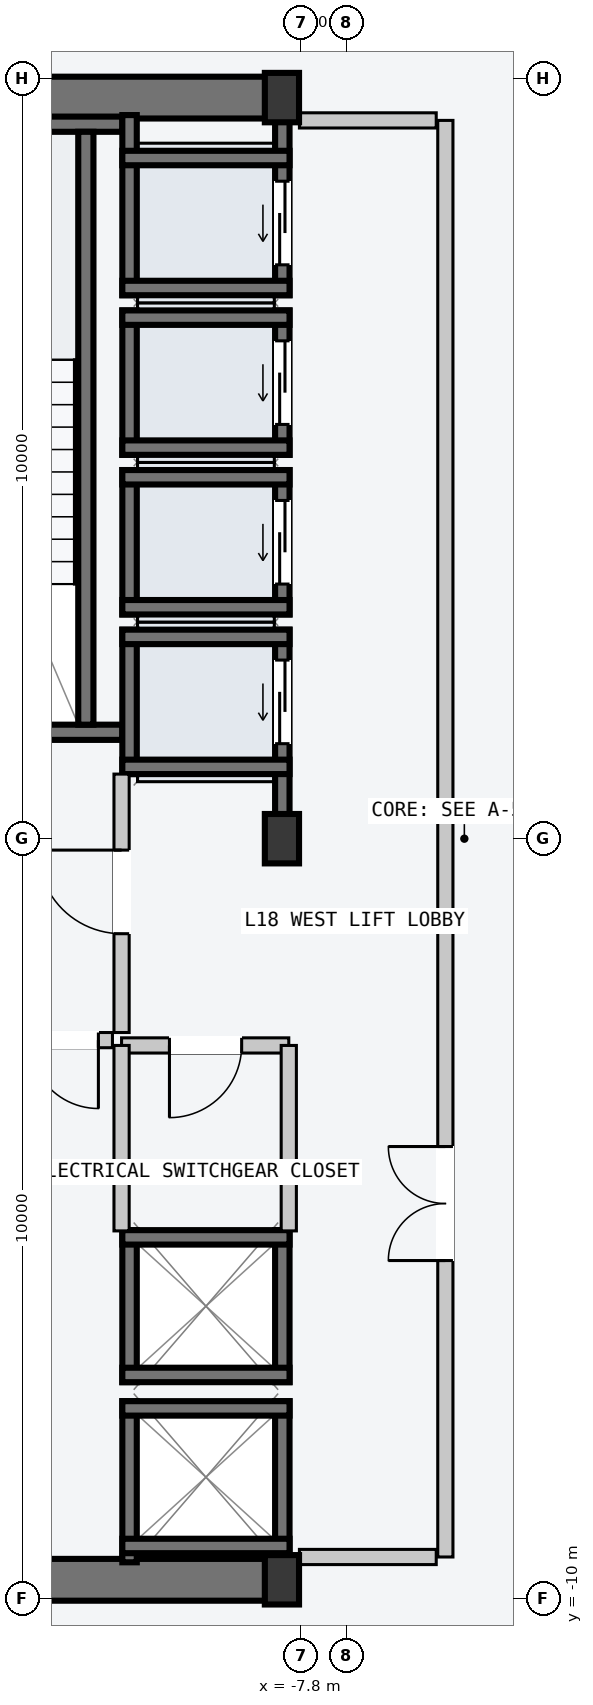
"""IFC4 building model, lengths in metres.
Left out: names, types, materials, properties, quantities, classifications, styles, units other than length and angle.
Written with IfcOpenShell. Run it as: python <this file> out.ifc"""

import sys

from ifc_helpers import new_model, si_unit, direction, frame, frame_2d, origin, origin_2d, place, context, subcontext, project, spatial, rectangle, i_section, extrude, element, fill, save


model = new_model("IFC4")
c1 = context("Model", 3, precision=1e-05, world=origin(), true_north=direction((0.0, 1.0)))
c2 = subcontext(c1, "Body", "Model", "MODEL_VIEW")
j1 = project(units=[si_unit("LENGTHUNIT", "METRE"), si_unit("PLANEANGLEUNIT", "RADIAN")], contexts=[c1])
p1 = place(None, origin())
s1 = spatial("IfcSite", under=j1, at=p1, CompositionType="ELEMENT")
p2 = place(p1, origin())
s2 = spatial("IfcBuilding", under=s1, at=p2, CompositionType="ELEMENT")
p3 = place(p2, frame((0.0, 0.0, 70.8)))
s3 = spatial("IfcBuildingStorey", under=s2, at=p3, CompositionType="ELEMENT", Elevation=70.8)
for number, where, z_axis, x_axis in (
    (1, (-14.53, -9.75, -0.2), (0.0, 0.0, 1.0), (1.0, 0.0, 0.0)),
    (2, (-14.53, 9.75, -0.2), (0.0, 0.0, 1.0), (1.0, 0.0, 0.0)),
):
    element("IfcWall", number, at=place(p3, frame(where, z_axis=z_axis, x_axis=x_axis)), inside=s3, PredefinedType="SHEAR", context=c2, shape_type="SweptSolid", body=[
        extrude(rectangle(XDim=6.46, YDim=0.55, at=frame_2d((3.23, 0.0))), origin(), (0.0, 0.0, 1.0), 3.6),
    ])
p4 = place(p3, frame((-14.25, 1.4, -0.2), z_axis=(0.0, 0.0, 1.0), x_axis=(1.0, 0.0, 0.0)))
e3 = element("IfcWall", 3, at=p4, inside=s3, PredefinedType="SOLIDWALL", context=c2, shape_type="SweptSolid", body=[
    extrude(rectangle(XDim=4.1, YDim=0.2, at=frame_2d((2.05, 0.0))), origin(), (0.0, 0.0, 1.0), 3.6),
])
p5 = place(p4, frame((1.5, 0.0, 0.2)))
e4 = element("IfcOpeningElement", 4, at=p5, cuts=e3, PredefinedType="OPENING", context=c2, shape_type="SweptSolid", body=[
    extrude(rectangle(XDim=1.12, YDim=2.18, at=frame_2d((0.56, 1.09))), frame((0.0, 0.11, 0.0), z_axis=(0.0, -1.0, 0.0), x_axis=(1.0, 0.0, 0.0)), (0.0, 0.0, 1.0), 0.22),
])
p6 = place(p3, frame((-14.25, 9.4, -0.2), z_axis=(0.0, 0.0, 1.0), x_axis=(1.0, 0.0, 0.0)))
e5 = element("IfcWall", 5, at=p6, inside=s3, PredefinedType="SOLIDWALL", context=c2, shape_type="SweptSolid", body=[
    extrude(rectangle(XDim=4.1, YDim=0.2, at=frame_2d((2.05, 0.0))), origin(), (0.0, 0.0, 1.0), 3.6),
])
p7 = place(p3, frame((-10.63, 1.5, -0.2), z_axis=(0.0, 0.0, 1.0), x_axis=(0.0, 1.0, 0.0)))
e6 = element("IfcWall", 6, at=p7, inside=s3, PredefinedType="SOLIDWALL", context=c2, shape_type="SweptSolid", body=[
    extrude(rectangle(XDim=7.8, YDim=0.2, at=frame_2d((3.9, 0.0))), origin(), (0.0, 0.0, 1.0), 3.6),
])
for number, where, z_axis, x_axis in (
    (7, (-8.05, -9.75, 0.0), (0.0, 0.0, 1.0), (1.0, 0.0, 0.0)),
    (8, (-8.05, 0.0, 0.0), (0.0, 0.0, 1.0), (1.0, 0.0, 0.0)),
    (9, (-8.05, 9.75, 0.0), (0.0, 0.0, 1.0), (1.0, 0.0, 0.0)),
):
    element("IfcColumn", number, at=place(p3, frame(where, z_axis=z_axis, x_axis=x_axis)), inside=s3, PredefinedType="COLUMN", context=c2, shape_type="SweptSolid", body=[
        extrude(i_section(OverallWidth=0.45, OverallDepth=0.65, WebThickness=0.025, FlangeThickness=0.04, at=origin_2d()), origin(), (0.0, 0.0, 1.0), 3.6),
    ])
p8 = place(p3, frame((-8.045, 0.21, -0.2), z_axis=(0.0, 0.0, 1.0), x_axis=(0.0, 1.0, 0.0)))
e10 = element("IfcWall", 10, at=p8, inside=s3, PredefinedType="SOLIDWALL", context=c2, shape_type="SweptSolid", body=[
    extrude(rectangle(XDim=2.54, YDim=0.19, at=frame_2d((1.27, 0.0))), origin(), (0.0, 0.0, 1.0), 3.6),
])
p9 = place(p8, frame((1.04, 0.0, 0.2)))
e11 = element("IfcOpeningElement", 11, at=p9, cuts=e10, PredefinedType="OPENING", context=c2, shape_type="SweptSolid", body=[
    extrude(rectangle(XDim=1.1, YDim=2.2, at=frame_2d((0.55, 1.1))), frame((0.0, 0.105, 0.0), z_axis=(0.0, -1.0, 0.0), x_axis=(1.0, 0.0, 0.0)), (0.0, 0.0, 1.0), 0.21),
])
p10 = place(p3, frame((-10.055, 0.85, -0.2), z_axis=(0.0, 0.0, 1.0), x_axis=(0.0, 1.0, 0.0)))
e12 = element("IfcWall", 12, at=p10, inside=s3, PredefinedType="SOLIDWALL", context=c2, shape_type="SweptSolid", body=[
    extrude(rectangle(XDim=1.9, YDim=0.19, at=frame_2d((0.95, 0.0))), origin(), (0.0, 0.0, 1.0), 3.6),
])
for number, where, z_axis, x_axis in (
    (13, (-10.15, 2.655, -0.2), (0.0, 0.0, 1.0), (1.0, 0.0, 0.0)),
    (14, (-10.15, 0.945, -0.2), (0.0, 0.0, 1.0), (1.0, 0.0, 0.0)),
):
    element("IfcWall", number, at=place(p3, frame(where, z_axis=z_axis, x_axis=x_axis)), inside=s3, PredefinedType="SOLIDWALL", context=c2, shape_type="SweptSolid", body=[
        extrude(rectangle(XDim=2.2, YDim=0.19, at=frame_2d((1.1, 0.0))), origin(), (0.0, 0.0, 1.0), 3.6),
    ])
p11 = place(p3, frame((-8.045, 2.95, -0.2), z_axis=(0.0, 0.0, 1.0), x_axis=(0.0, 1.0, 0.0)))
e15 = element("IfcWall", 15, at=p11, inside=s3, PredefinedType="SOLIDWALL", context=c2, shape_type="SweptSolid", body=[
    extrude(rectangle(XDim=1.9, YDim=0.19, at=frame_2d((0.95, 0.0))), origin(), (0.0, 0.0, 1.0), 3.6),
])
p12 = place(p11, frame((0.4, 0.0, 0.2)))
e16 = element("IfcOpeningElement", 16, at=p12, cuts=e15, PredefinedType="OPENING", context=c2, shape_type="SweptSolid", body=[
    extrude(rectangle(XDim=1.1, YDim=2.2, at=frame_2d((0.55, 1.1))), frame((0.0, 0.105, 0.0), z_axis=(0.0, -1.0, 0.0), x_axis=(1.0, 0.0, 0.0)), (0.0, 0.0, 1.0), 0.21),
])
p13 = place(p3, frame((-10.055, 2.95, -0.2), z_axis=(0.0, 0.0, 1.0), x_axis=(0.0, 1.0, 0.0)))
e17 = element("IfcWall", 17, at=p13, inside=s3, PredefinedType="SOLIDWALL", context=c2, shape_type="SweptSolid", body=[
    extrude(rectangle(XDim=1.9, YDim=0.19, at=frame_2d((0.95, 0.0))), origin(), (0.0, 0.0, 1.0), 3.6),
])
for number, where, z_axis, x_axis in (
    (18, (-10.15, 4.755, -0.2), (0.0, 0.0, 1.0), (1.0, 0.0, 0.0)),
    (19, (-10.15, 3.045, -0.2), (0.0, 0.0, 1.0), (1.0, 0.0, 0.0)),
):
    element("IfcWall", number, at=place(p3, frame(where, z_axis=z_axis, x_axis=x_axis)), inside=s3, PredefinedType="SOLIDWALL", context=c2, shape_type="SweptSolid", body=[
        extrude(rectangle(XDim=2.2, YDim=0.19, at=frame_2d((1.1, 0.0))), origin(), (0.0, 0.0, 1.0), 3.6),
    ])
p14 = place(p3, frame((-8.045, 5.05, -0.2), z_axis=(0.0, 0.0, 1.0), x_axis=(0.0, 1.0, 0.0)))
e20 = element("IfcWall", 20, at=p14, inside=s3, PredefinedType="SOLIDWALL", context=c2, shape_type="SweptSolid", body=[
    extrude(rectangle(XDim=1.9, YDim=0.19, at=frame_2d((0.95, 0.0))), origin(), (0.0, 0.0, 1.0), 3.6),
])
p15 = place(p14, frame((0.4, 0.0, 0.2)))
e21 = element("IfcOpeningElement", 21, at=p15, cuts=e20, PredefinedType="OPENING", context=c2, shape_type="SweptSolid", body=[
    extrude(rectangle(XDim=1.1, YDim=2.2, at=frame_2d((0.55, 1.1))), frame((0.0, 0.105, 0.0), z_axis=(0.0, -1.0, 0.0), x_axis=(1.0, 0.0, 0.0)), (0.0, 0.0, 1.0), 0.21),
])
p16 = place(p3, frame((-10.055, 5.05, -0.2), z_axis=(0.0, 0.0, 1.0), x_axis=(0.0, 1.0, 0.0)))
e22 = element("IfcWall", 22, at=p16, inside=s3, PredefinedType="SOLIDWALL", context=c2, shape_type="SweptSolid", body=[
    extrude(rectangle(XDim=1.9, YDim=0.19, at=frame_2d((0.95, 0.0))), origin(), (0.0, 0.0, 1.0), 3.6),
])
for number, where, z_axis, x_axis in (
    (23, (-10.15, 6.855, -0.2), (0.0, 0.0, 1.0), (1.0, 0.0, 0.0)),
    (24, (-10.15, 5.145, -0.2), (0.0, 0.0, 1.0), (1.0, 0.0, 0.0)),
):
    element("IfcWall", number, at=place(p3, frame(where, z_axis=z_axis, x_axis=x_axis)), inside=s3, PredefinedType="SOLIDWALL", context=c2, shape_type="SweptSolid", body=[
        extrude(rectangle(XDim=2.2, YDim=0.19, at=frame_2d((1.1, 0.0))), origin(), (0.0, 0.0, 1.0), 3.6),
    ])
p17 = place(p3, frame((-8.045, 7.15, -0.2), z_axis=(0.0, 0.0, 1.0), x_axis=(0.0, 1.0, 0.0)))
e25 = element("IfcWall", 25, at=p17, inside=s3, PredefinedType="SOLIDWALL", context=c2, shape_type="SweptSolid", body=[
    extrude(rectangle(XDim=2.37, YDim=0.19, at=frame_2d((1.185, 0.0))), origin(), (0.0, 0.0, 1.0), 3.6),
])
p18 = place(p17, frame((0.4, 0.0, 0.2)))
e26 = element("IfcOpeningElement", 26, at=p18, cuts=e25, PredefinedType="OPENING", context=c2, shape_type="SweptSolid", body=[
    extrude(rectangle(XDim=1.1, YDim=2.2, at=frame_2d((0.55, 1.1))), frame((0.0, 0.105, 0.0), z_axis=(0.0, -1.0, 0.0), x_axis=(1.0, 0.0, 0.0)), (0.0, 0.0, 1.0), 0.21),
])
p19 = place(p3, frame((-10.055, 7.15, -0.2), z_axis=(0.0, 0.0, 1.0), x_axis=(0.0, 1.0, 0.0)))
e27 = element("IfcWall", 27, at=p19, inside=s3, PredefinedType="SOLIDWALL", context=c2, shape_type="SweptSolid", body=[
    extrude(rectangle(XDim=2.37, YDim=0.19, at=frame_2d((1.185, 0.0))), origin(), (0.0, 0.0, 1.0), 3.6),
])
for number, where, z_axis, x_axis in (
    (28, (-10.15, 8.955, -0.2), (0.0, 0.0, 1.0), (1.0, 0.0, 0.0)),
    (29, (-10.15, 7.245, -0.2), (0.0, 0.0, 1.0), (1.0, 0.0, 0.0)),
):
    element("IfcWall", number, at=place(p3, frame(where, z_axis=z_axis, x_axis=x_axis)), inside=s3, PredefinedType="SOLIDWALL", context=c2, shape_type="SweptSolid", body=[
        extrude(rectangle(XDim=2.2, YDim=0.19, at=frame_2d((1.1, 0.0))), origin(), (0.0, 0.0, 1.0), 3.6),
    ])
for number, where, z_axis, x_axis in (
    (30, (-8.045, -9.52, -0.2), (0.0, 0.0, 1.0), (0.0, 1.0, 0.0)),
    (31, (-10.055, -9.52, -0.2), (0.0, 0.0, 1.0), (0.0, 1.0, 0.0)),
):
    element("IfcWall", number, at=place(p3, frame(where, z_axis=z_axis, x_axis=x_axis)), inside=s3, PredefinedType="SOLIDWALL", context=c2, shape_type="SweptSolid", body=[
        extrude(rectangle(XDim=2.12, YDim=0.19, at=frame_2d((1.06, 0.0))), origin(), (0.0, 0.0, 1.0), 3.6),
    ])
for number, where, z_axis, x_axis in (
    (32, (-10.15, -7.495, -0.2), (0.0, 0.0, 1.0), (1.0, 0.0, 0.0)),
    (33, (-10.15, -9.305, -0.2), (0.0, 0.0, 1.0), (1.0, 0.0, 0.0)),
):
    element("IfcWall", number, at=place(p3, frame(where, z_axis=z_axis, x_axis=x_axis)), inside=s3, PredefinedType="SOLIDWALL", context=c2, shape_type="SweptSolid", body=[
        extrude(rectangle(XDim=2.2, YDim=0.19, at=frame_2d((1.1, 0.0))), origin(), (0.0, 0.0, 1.0), 3.6),
    ])
for number, where, z_axis, x_axis in (
    (34, (-8.045, -7.15, -0.2), (0.0, 0.0, 1.0), (0.0, 1.0, 0.0)),
    (35, (-10.055, -7.15, -0.2), (0.0, 0.0, 1.0), (0.0, 1.0, 0.0)),
):
    element("IfcWall", number, at=place(p3, frame(where, z_axis=z_axis, x_axis=x_axis)), inside=s3, PredefinedType="SOLIDWALL", context=c2, shape_type="SweptSolid", body=[
        extrude(rectangle(XDim=2.0, YDim=0.19, at=frame_2d((1.0, 0.0))), origin(), (0.0, 0.0, 1.0), 3.6),
    ])
for number, where, z_axis, x_axis in (
    (36, (-10.15, -5.245, -0.2), (0.0, 0.0, 1.0), (1.0, 0.0, 0.0)),
    (37, (-10.15, -7.055, -0.2), (0.0, 0.0, 1.0), (1.0, 0.0, 0.0)),
):
    element("IfcWall", number, at=place(p3, frame(where, z_axis=z_axis, x_axis=x_axis)), inside=s3, PredefinedType="SOLIDWALL", context=c2, shape_type="SweptSolid", body=[
        extrude(rectangle(XDim=2.2, YDim=0.19, at=frame_2d((1.1, 0.0))), origin(), (0.0, 0.0, 1.0), 3.6),
    ])
p20 = place(p3, frame((-5.9, -9.45, 0.0), z_axis=(0.0, 0.0, 1.0), x_axis=(0.0, 1.0, 0.0)))
e38 = element("IfcWall", 38, at=p20, inside=s3, PredefinedType="PARTITIONING", context=c2, shape_type="SweptSolid", body=[
    extrude(rectangle(XDim=18.9, YDim=0.2, at=frame_2d((9.45, 0.0))), origin(), (0.0, 0.0, 1.0), 3.4),
])
p21 = place(p20, frame((3.9, 0.0, 0.0)))
e39 = element("IfcOpeningElement", 39, at=p21, cuts=e38, PredefinedType="OPENING", context=c2, shape_type="SweptSolid", body=[
    extrude(rectangle(XDim=1.5, YDim=2.2, at=frame_2d((0.75, 1.1))), frame((0.0, 0.11, 0.0), z_axis=(0.0, -1.0, 0.0), x_axis=(1.0, 0.0, 0.0)), (0.0, 0.0, 1.0), 0.22),
])
for number, where, z_axis, x_axis in (
    (40, (-6.02, -9.45, 0.0), (0.0, 0.0, 1.0), (-1.0, 0.0, 0.0)),
    (41, (-6.02, 9.45, 0.0), (0.0, 0.0, 1.0), (-1.0, 0.0, 0.0)),
):
    element("IfcWall", number, at=place(p3, frame(where, z_axis=z_axis, x_axis=x_axis)), inside=s3, PredefinedType="PARTITIONING", context=c2, shape_type="SweptSolid", body=[
        extrude(rectangle(XDim=1.8, YDim=0.2, at=frame_2d((0.9, 0.0))), origin(), (0.0, 0.0, 1.0), 3.4),
    ])
p22 = place(p3, frame((-10.16, -2.55, 0.0), z_axis=(0.0, 0.0, 1.0), x_axis=(0.0, 1.0, 0.0)))
e42 = element("IfcWall", 42, at=p22, inside=s3, PredefinedType="PARTITIONING", context=c2, shape_type="SweptSolid", body=[
    extrude(rectangle(XDim=3.4, YDim=0.2, at=frame_2d((1.7, 0.0))), origin(), (0.0, 0.0, 1.0), 3.4),
])
p23 = place(p22, frame((1.3, 0.0, 0.0)))
e43 = element("IfcOpeningElement", 43, at=p23, cuts=e42, PredefinedType="OPENING", context=c2, shape_type="SweptSolid", body=[
    extrude(rectangle(XDim=1.1, YDim=2.15, at=frame_2d((0.55, 1.075))), frame((0.0, 0.11, 0.0), z_axis=(0.0, -1.0, 0.0), x_axis=(1.0, 0.0, 0.0)), (0.0, 0.0, 1.0), 0.22),
])
p24 = place(p3, frame((-10.28, -2.65, 0.0), z_axis=(0.0, 0.0, 1.0), x_axis=(-1.0, 0.0, 0.0)))
e44 = element("IfcWall", 44, at=p24, inside=s3, PredefinedType="PARTITIONING", context=c2, shape_type="SweptSolid", body=[
    extrude(rectangle(XDim=1.27, YDim=0.2, at=frame_2d((0.635, 0.0))), origin(), (0.0, 0.0, 1.0), 3.4),
])
p25 = place(p24, frame((0.185, 0.0, 0.0)))
e45 = element("IfcOpeningElement", 45, at=p25, cuts=e44, PredefinedType="OPENING", context=c2, shape_type="SweptSolid", body=[
    extrude(rectangle(XDim=0.9, YDim=2.15, at=frame_2d((0.45, 1.075))), frame((0.0, 0.11, 0.0), z_axis=(0.0, -1.0, 0.0), x_axis=(1.0, 0.0, 0.0)), (0.0, 0.0, 1.0), 0.22),
])
p26 = place(p3, frame((-7.96, -2.72, 0.0), z_axis=(0.0, 0.0, 1.0), x_axis=(-1.0, 0.0, 0.0)))
e46 = element("IfcWall", 46, at=p26, inside=s3, PredefinedType="PARTITIONING", context=c2, shape_type="SweptSolid", body=[
    extrude(rectangle(XDim=2.2, YDim=0.2, at=frame_2d((1.1, 0.0))), origin(), (0.0, 0.0, 1.0), 3.4),
])
p27 = place(p26, frame((0.62, 0.0, 0.0)))
e47 = element("IfcOpeningElement", 47, at=p27, cuts=e46, PredefinedType="OPENING", context=c2, shape_type="SweptSolid", body=[
    extrude(rectangle(XDim=0.95, YDim=2.1, at=frame_2d((0.475, 1.05))), frame((0.0, 0.11, 0.0), z_axis=(0.0, -1.0, 0.0), x_axis=(1.0, 0.0, 0.0)), (0.0, 0.0, 1.0), 0.22),
])
for number, where, z_axis, x_axis in (
    (48, (-7.96, -5.16, 0.0), (0.0, 0.0, 1.0), (0.0, 1.0, 0.0)),
    (49, (-10.16, -5.16, 0.0), (0.0, 0.0, 1.0), (0.0, 1.0, 0.0)),
):
    element("IfcWall", number, at=place(p3, frame(where, z_axis=z_axis, x_axis=x_axis)), inside=s3, PredefinedType="PARTITIONING", context=c2, shape_type="SweptSolid", body=[
        extrude(rectangle(XDim=2.44, YDim=0.2, at=frame_2d((1.22, 0.0))), origin(), (0.0, 0.0, 1.0), 3.4),
    ])
p28 = place(p9, origin())
e50 = element("IfcDoor", 50, at=p28, inside=s3, OperationType="SLIDING_TO_LEFT", PredefinedType="DOOR", context=c2, shape_type="SweptSolid", body=[
    extrude(rectangle(XDim=1.1, YDim=2.2, at=frame_2d((0.55, 1.1))), frame((0.0, 0.025, 0.0), z_axis=(0.0, -1.0, 0.0), x_axis=(1.0, 0.0, 0.0)), (0.0, 0.0, 1.0), 0.05),
])
fill(e11, e50)
p29 = place(p12, origin())
e51 = element("IfcDoor", 51, at=p29, inside=s3, OperationType="SLIDING_TO_LEFT", PredefinedType="DOOR", context=c2, shape_type="SweptSolid", body=[
    extrude(rectangle(XDim=1.1, YDim=2.2, at=frame_2d((0.55, 1.1))), frame((0.0, 0.025, 0.0), z_axis=(0.0, -1.0, 0.0), x_axis=(1.0, 0.0, 0.0)), (0.0, 0.0, 1.0), 0.05),
])
fill(e16, e51)
p30 = place(p15, origin())
e52 = element("IfcDoor", 52, at=p30, inside=s3, OperationType="SLIDING_TO_LEFT", PredefinedType="DOOR", context=c2, shape_type="SweptSolid", body=[
    extrude(rectangle(XDim=1.1, YDim=2.2, at=frame_2d((0.55, 1.1))), frame((0.0, 0.025, 0.0), z_axis=(0.0, -1.0, 0.0), x_axis=(1.0, 0.0, 0.0)), (0.0, 0.0, 1.0), 0.05),
])
fill(e21, e52)
p31 = place(p18, origin())
e53 = element("IfcDoor", 53, at=p31, inside=s3, OperationType="SLIDING_TO_LEFT", PredefinedType="DOOR", context=c2, shape_type="SweptSolid", body=[
    extrude(rectangle(XDim=1.1, YDim=2.2, at=frame_2d((0.55, 1.1))), frame((0.0, 0.025, 0.0), z_axis=(0.0, -1.0, 0.0), x_axis=(1.0, 0.0, 0.0)), (0.0, 0.0, 1.0), 0.05),
])
fill(e26, e53)
p32 = place(p21, origin())
e54 = element("IfcDoor", 54, at=p32, inside=s3, OperationType="DOUBLE_DOOR_SINGLE_SWING", PredefinedType="DOOR", context=c2, shape_type="SweptSolid", body=[
    extrude(rectangle(XDim=1.5, YDim=2.2, at=frame_2d((0.75, 1.1))), frame((0.0, 0.025, 0.0), z_axis=(0.0, -1.0, 0.0), x_axis=(1.0, 0.0, 0.0)), (0.0, 0.0, 1.0), 0.05),
])
fill(e39, e54)
p33 = place(p23, origin())
e55 = element("IfcDoor", 55, at=p33, inside=s3, OperationType="SINGLE_SWING_RIGHT", PredefinedType="DOOR", context=c2, shape_type="SweptSolid", body=[
    extrude(rectangle(XDim=1.1, YDim=2.15, at=frame_2d((0.55, 1.075))), frame((0.0, 0.025, 0.0), z_axis=(0.0, -1.0, 0.0), x_axis=(1.0, 0.0, 0.0)), (0.0, 0.0, 1.0), 0.05),
])
fill(e43, e55)
p34 = place(p25, origin())
e56 = element("IfcDoor", 56, at=p34, inside=s3, OperationType="SINGLE_SWING_LEFT", PredefinedType="DOOR", context=c2, shape_type="SweptSolid", body=[
    extrude(rectangle(XDim=0.9, YDim=2.15, at=frame_2d((0.45, 1.075))), frame((0.0, 0.025, 0.0), z_axis=(0.0, -1.0, 0.0), x_axis=(1.0, 0.0, 0.0)), (0.0, 0.0, 1.0), 0.05),
])
fill(e45, e56)
p35 = place(p27, origin())
e57 = element("IfcDoor", 57, at=p35, inside=s3, OperationType="SINGLE_SWING_RIGHT", PredefinedType="DOOR", context=c2, shape_type="SweptSolid", body=[
    extrude(rectangle(XDim=0.95, YDim=2.1, at=frame_2d((0.475, 1.05))), frame((0.0, 0.025, 0.0), z_axis=(0.0, -1.0, 0.0), x_axis=(1.0, 0.0, 0.0)), (0.0, 0.0, 1.0), 0.05),
])
fill(e47, e57)
save(model, sys.argv[1])
